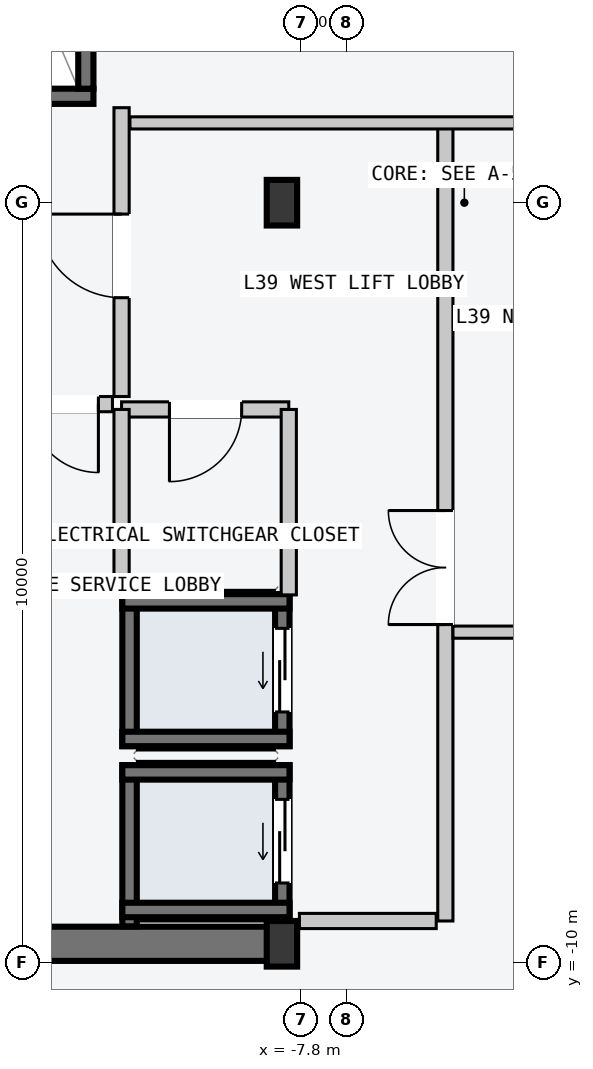
"""IFC4 building model, lengths in metres.
Left out: names, types, materials, properties, quantities, classifications, styles, units other than length and angle.
Written with IfcOpenShell. Run it as: python <this file> out.ifc"""

import sys

from ifc_helpers import new_model, si_unit, direction, frame, frame_2d, origin, origin_2d, place, context, subcontext, project, spatial, rectangle, i_section, extrude, element, fill, save


model = new_model("IFC4")
c1 = context("Model", 3, precision=1e-05, world=origin(), true_north=direction((0.0, 1.0)))
c2 = subcontext(c1, "Body", "Model", "MODEL_VIEW")
j1 = project(units=[si_unit("LENGTHUNIT", "METRE"), si_unit("PLANEANGLEUNIT", "RADIAN")], contexts=[c1])
p1 = place(None, origin())
s1 = spatial("IfcSite", under=j1, at=p1, CompositionType="ELEMENT")
p2 = place(p1, origin())
s2 = spatial("IfcBuilding", under=s1, at=p2, CompositionType="ELEMENT")
p3 = place(p2, frame((0.0, 0.0, 150.6)))
s3 = spatial("IfcBuildingStorey", under=s2, at=p3, CompositionType="ELEMENT", Elevation=150.6)
p4 = place(p3, frame((-14.53, -9.75, -0.2), z_axis=(0.0, 0.0, 1.0), x_axis=(1.0, 0.0, 0.0)))
e1 = element("IfcWall", 1, at=p4, inside=s3, PredefinedType="SHEAR", context=c2, shape_type="SweptSolid", body=[
    extrude(rectangle(XDim=6.46, YDim=0.45, at=frame_2d((3.23, 0.0))), origin(), (0.0, 0.0, 1.0), 4.5),
])
p5 = place(p3, frame((-14.25, 1.4, -0.2), z_axis=(0.0, 0.0, 1.0), x_axis=(1.0, 0.0, 0.0)))
e2 = element("IfcWall", 2, at=p5, inside=s3, PredefinedType="SOLIDWALL", context=c2, shape_type="SweptSolid", body=[
    extrude(rectangle(XDim=3.72, YDim=0.2, at=frame_2d((1.86, 0.0))), origin(), (0.0, 0.0, 1.0), 4.5),
])
p6 = place(p5, frame((1.5, 0.0, 0.2)))
e3 = element("IfcOpeningElement", 3, at=p6, cuts=e2, PredefinedType="OPENING", context=c2, shape_type="SweptSolid", body=[
    extrude(rectangle(XDim=1.12, YDim=2.18, at=frame_2d((0.56, 1.09))), frame((0.0, 0.11, 0.0), z_axis=(0.0, -1.0, 0.0), x_axis=(1.0, 0.0, 0.0)), (0.0, 0.0, 1.0), 0.22),
])
p7 = place(p3, frame((-10.63, 1.5, -0.2), z_axis=(0.0, 0.0, 1.0), x_axis=(0.0, 1.0, 0.0)))
e4 = element("IfcWall", 4, at=p7, inside=s3, PredefinedType="SOLIDWALL", context=c2, shape_type="SweptSolid", body=[
    extrude(rectangle(XDim=7.8, YDim=0.2, at=frame_2d((3.9, 0.0))), origin(), (0.0, 0.0, 1.0), 4.5),
])
for number, where, z_axis, x_axis in (
    (5, (-8.05, -9.75, 0.0), (0.0, 0.0, 1.0), (1.0, 0.0, 0.0)),
    (6, (-8.05, 0.0, 0.0), (0.0, 0.0, 1.0), (1.0, 0.0, 0.0)),
):
    element("IfcColumn", number, at=place(p3, frame(where, z_axis=z_axis, x_axis=x_axis)), inside=s3, PredefinedType="COLUMN", context=c2, shape_type="SweptSolid", body=[
        extrude(i_section(OverallWidth=0.4, OverallDepth=0.6, WebThickness=0.022, FlangeThickness=0.036, at=origin_2d()), origin(), (0.0, 0.0, 1.0), 4.5),
    ])
p8 = place(p3, frame((-8.045, -9.52, -0.2), z_axis=(0.0, 0.0, 1.0), x_axis=(0.0, 1.0, 0.0)))
e7 = element("IfcWall", 7, at=p8, inside=s3, PredefinedType="SOLIDWALL", context=c2, shape_type="SweptSolid", body=[
    extrude(rectangle(XDim=2.12, YDim=0.19, at=frame_2d((1.06, 0.0))), origin(), (0.0, 0.0, 1.0), 4.5),
])
p9 = place(p8, frame((0.57, 0.0, 0.2)))
e8 = element("IfcOpeningElement", 8, at=p9, cuts=e7, PredefinedType="OPENING", context=c2, shape_type="SweptSolid", body=[
    extrude(rectangle(XDim=1.1, YDim=2.2, at=frame_2d((0.55, 1.1))), frame((0.0, 0.105, 0.0), z_axis=(0.0, -1.0, 0.0), x_axis=(1.0, 0.0, 0.0)), (0.0, 0.0, 1.0), 0.21),
])
p10 = place(p3, frame((-10.055, -9.52, -0.2), z_axis=(0.0, 0.0, 1.0), x_axis=(0.0, 1.0, 0.0)))
e9 = element("IfcWall", 9, at=p10, inside=s3, PredefinedType="SOLIDWALL", context=c2, shape_type="SweptSolid", body=[
    extrude(rectangle(XDim=2.12, YDim=0.19, at=frame_2d((1.06, 0.0))), origin(), (0.0, 0.0, 1.0), 4.5),
])
for number, where, z_axis, x_axis in (
    (10, (-10.15, -7.495, -0.2), (0.0, 0.0, 1.0), (1.0, 0.0, 0.0)),
    (11, (-10.15, -9.305, -0.2), (0.0, 0.0, 1.0), (1.0, 0.0, 0.0)),
):
    element("IfcWall", number, at=place(p3, frame(where, z_axis=z_axis, x_axis=x_axis)), inside=s3, PredefinedType="SOLIDWALL", context=c2, shape_type="SweptSolid", body=[
        extrude(rectangle(XDim=2.2, YDim=0.19, at=frame_2d((1.1, 0.0))), origin(), (0.0, 0.0, 1.0), 4.5),
    ])
p11 = place(p3, frame((-8.045, -7.15, -0.2), z_axis=(0.0, 0.0, 1.0), x_axis=(0.0, 1.0, 0.0)))
e12 = element("IfcWall", 12, at=p11, inside=s3, PredefinedType="SOLIDWALL", context=c2, shape_type="SweptSolid", body=[
    extrude(rectangle(XDim=2.0, YDim=0.19, at=frame_2d((1.0, 0.0))), origin(), (0.0, 0.0, 1.0), 4.5),
])
p12 = place(p11, frame((0.45, 0.0, 0.2)))
e13 = element("IfcOpeningElement", 13, at=p12, cuts=e12, PredefinedType="OPENING", context=c2, shape_type="SweptSolid", body=[
    extrude(rectangle(XDim=1.1, YDim=2.2, at=frame_2d((0.55, 1.1))), frame((0.0, 0.105, 0.0), z_axis=(0.0, -1.0, 0.0), x_axis=(1.0, 0.0, 0.0)), (0.0, 0.0, 1.0), 0.21),
])
p13 = place(p3, frame((-10.055, -7.15, -0.2), z_axis=(0.0, 0.0, 1.0), x_axis=(0.0, 1.0, 0.0)))
e14 = element("IfcWall", 14, at=p13, inside=s3, PredefinedType="SOLIDWALL", context=c2, shape_type="SweptSolid", body=[
    extrude(rectangle(XDim=2.0, YDim=0.19, at=frame_2d((1.0, 0.0))), origin(), (0.0, 0.0, 1.0), 4.5),
])
for number, where, z_axis, x_axis in (
    (15, (-10.15, -5.245, -0.2), (0.0, 0.0, 1.0), (1.0, 0.0, 0.0)),
    (16, (-10.15, -7.055, -0.2), (0.0, 0.0, 1.0), (1.0, 0.0, 0.0)),
):
    element("IfcWall", number, at=place(p3, frame(where, z_axis=z_axis, x_axis=x_axis)), inside=s3, PredefinedType="SOLIDWALL", context=c2, shape_type="SweptSolid", body=[
        extrude(rectangle(XDim=2.2, YDim=0.19, at=frame_2d((1.1, 0.0))), origin(), (0.0, 0.0, 1.0), 4.5),
    ])
p14 = place(p3, frame((-5.9, -9.45, 0.0), z_axis=(0.0, 0.0, 1.0), x_axis=(0.0, 1.0, 0.0)))
e17 = element("IfcWall", 17, at=p14, inside=s3, PredefinedType="PARTITIONING", context=c2, shape_type="SweptSolid", body=[
    extrude(rectangle(XDim=10.5, YDim=0.2, at=frame_2d((5.25, 0.0))), origin(), (0.0, 0.0, 1.0), 4.3),
])
p15 = place(p14, frame((3.9, 0.0, 0.0)))
e18 = element("IfcOpeningElement", 18, at=p15, cuts=e17, PredefinedType="OPENING", context=c2, shape_type="SweptSolid", body=[
    extrude(rectangle(XDim=1.5, YDim=2.2, at=frame_2d((0.75, 1.1))), frame((0.0, 0.11, 0.0), z_axis=(0.0, -1.0, 0.0), x_axis=(1.0, 0.0, 0.0)), (0.0, 0.0, 1.0), 0.22),
])
p16 = place(p3, frame((-6.02, -9.45, 0.0), z_axis=(0.0, 0.0, 1.0), x_axis=(-1.0, 0.0, 0.0)))
e19 = element("IfcWall", 19, at=p16, inside=s3, PredefinedType="PARTITIONING", context=c2, shape_type="SweptSolid", body=[
    extrude(rectangle(XDim=1.8, YDim=0.2, at=frame_2d((0.9, 0.0))), origin(), (0.0, 0.0, 1.0), 4.3),
])
p17 = place(p3, frame((-10.16, -2.55, 0.0), z_axis=(0.0, 0.0, 1.0), x_axis=(0.0, 1.0, 0.0)))
e20 = element("IfcWall", 20, at=p17, inside=s3, PredefinedType="PARTITIONING", context=c2, shape_type="SweptSolid", body=[
    extrude(rectangle(XDim=3.8, YDim=0.2, at=frame_2d((1.9, 0.0))), origin(), (0.0, 0.0, 1.0), 4.3),
])
p18 = place(p17, frame((1.3, 0.0, 0.0)))
e21 = element("IfcOpeningElement", 21, at=p18, cuts=e20, PredefinedType="OPENING", context=c2, shape_type="SweptSolid", body=[
    extrude(rectangle(XDim=1.1, YDim=2.15, at=frame_2d((0.55, 1.075))), frame((0.0, 0.11, 0.0), z_axis=(0.0, -1.0, 0.0), x_axis=(1.0, 0.0, 0.0)), (0.0, 0.0, 1.0), 0.22),
])
p19 = place(p3, frame((-10.28, -2.65, 0.0), z_axis=(0.0, 0.0, 1.0), x_axis=(-1.0, 0.0, 0.0)))
e22 = element("IfcWall", 22, at=p19, inside=s3, PredefinedType="PARTITIONING", context=c2, shape_type="SweptSolid", body=[
    extrude(rectangle(XDim=1.27, YDim=0.2, at=frame_2d((0.635, 0.0))), origin(), (0.0, 0.0, 1.0), 4.3),
])
p20 = place(p19, frame((0.185, 0.0, 0.0)))
e23 = element("IfcOpeningElement", 23, at=p20, cuts=e22, PredefinedType="OPENING", context=c2, shape_type="SweptSolid", body=[
    extrude(rectangle(XDim=0.9, YDim=2.15, at=frame_2d((0.45, 1.075))), frame((0.0, 0.11, 0.0), z_axis=(0.0, -1.0, 0.0), x_axis=(1.0, 0.0, 0.0)), (0.0, 0.0, 1.0), 0.22),
])
p21 = place(p3, frame((-7.96, -2.72, 0.0), z_axis=(0.0, 0.0, 1.0), x_axis=(-1.0, 0.0, 0.0)))
e24 = element("IfcWall", 24, at=p21, inside=s3, PredefinedType="PARTITIONING", context=c2, shape_type="SweptSolid", body=[
    extrude(rectangle(XDim=2.2, YDim=0.2, at=frame_2d((1.1, 0.0))), origin(), (0.0, 0.0, 1.0), 4.3),
])
p22 = place(p21, frame((0.62, 0.0, 0.0)))
e25 = element("IfcOpeningElement", 25, at=p22, cuts=e24, PredefinedType="OPENING", context=c2, shape_type="SweptSolid", body=[
    extrude(rectangle(XDim=0.95, YDim=2.1, at=frame_2d((0.475, 1.05))), frame((0.0, 0.11, 0.0), z_axis=(0.0, -1.0, 0.0), x_axis=(1.0, 0.0, 0.0)), (0.0, 0.0, 1.0), 0.22),
])
for number, where, z_axis, x_axis in (
    (26, (-7.96, -5.16, 0.0), (0.0, 0.0, 1.0), (0.0, 1.0, 0.0)),
    (27, (-10.16, -5.16, 0.0), (0.0, 0.0, 1.0), (0.0, 1.0, 0.0)),
):
    element("IfcWall", number, at=place(p3, frame(where, z_axis=z_axis, x_axis=x_axis)), inside=s3, PredefinedType="PARTITIONING", context=c2, shape_type="SweptSolid", body=[
        extrude(rectangle(XDim=2.44, YDim=0.2, at=frame_2d((1.22, 0.0))), origin(), (0.0, 0.0, 1.0), 4.3),
    ])
p23 = place(p3, frame((-10.05, 1.05, 0.0), z_axis=(0.0, 0.0, 1.0), x_axis=(1.0, 0.0, 0.0)))
e28 = element("IfcWall", 28, at=p23, inside=s3, PredefinedType="PARTITIONING", context=c2, shape_type="SweptSolid", body=[
    extrude(rectangle(XDim=6.21, YDim=0.16, at=frame_2d((3.105, 0.0))), origin(), (0.0, 0.0, 1.0), 4.3),
])
p24 = place(p3, frame((-5.8, -5.65, 0.0), z_axis=(0.0, 0.0, 1.0), x_axis=(1.0, 0.0, 0.0)))
e29 = element("IfcWall", 29, at=p24, inside=s3, PredefinedType="PARTITIONING", context=c2, shape_type="SweptSolid", body=[
    extrude(rectangle(XDim=11.6, YDim=0.16, at=frame_2d((5.8, 0.0))), origin(), (0.0, 0.0, 1.0), 4.3),
])
p25 = place(p24, frame((5.1, 0.0, 0.0)))
e30 = element("IfcOpeningElement", 30, at=p25, cuts=e29, PredefinedType="OPENING", context=c2, shape_type="SweptSolid", body=[
    extrude(rectangle(XDim=1.4, YDim=2.2, at=frame_2d((0.7, 1.1))), frame((0.0, 0.09, 0.0), z_axis=(0.0, -1.0, 0.0), x_axis=(1.0, 0.0, 0.0)), (0.0, 0.0, 1.0), 0.18),
])
p26 = place(p9, origin())
e31 = element("IfcDoor", 31, at=p26, inside=s3, OperationType="SLIDING_TO_LEFT", PredefinedType="DOOR", context=c2, shape_type="SweptSolid", body=[
    extrude(rectangle(XDim=1.1, YDim=2.2, at=frame_2d((0.55, 1.1))), frame((0.0, 0.025, 0.0), z_axis=(0.0, -1.0, 0.0), x_axis=(1.0, 0.0, 0.0)), (0.0, 0.0, 1.0), 0.05),
])
fill(e8, e31)
p27 = place(p12, origin())
e32 = element("IfcDoor", 32, at=p27, inside=s3, OperationType="SLIDING_TO_LEFT", PredefinedType="DOOR", context=c2, shape_type="SweptSolid", body=[
    extrude(rectangle(XDim=1.1, YDim=2.2, at=frame_2d((0.55, 1.1))), frame((0.0, 0.025, 0.0), z_axis=(0.0, -1.0, 0.0), x_axis=(1.0, 0.0, 0.0)), (0.0, 0.0, 1.0), 0.05),
])
fill(e13, e32)
p28 = place(p15, origin())
e33 = element("IfcDoor", 33, at=p28, inside=s3, OperationType="DOUBLE_DOOR_SINGLE_SWING", PredefinedType="DOOR", context=c2, shape_type="SweptSolid", body=[
    extrude(rectangle(XDim=1.5, YDim=2.2, at=frame_2d((0.75, 1.1))), frame((0.0, 0.025, 0.0), z_axis=(0.0, -1.0, 0.0), x_axis=(1.0, 0.0, 0.0)), (0.0, 0.0, 1.0), 0.05),
])
fill(e18, e33)
p29 = place(p18, origin())
e34 = element("IfcDoor", 34, at=p29, inside=s3, OperationType="SINGLE_SWING_RIGHT", PredefinedType="DOOR", context=c2, shape_type="SweptSolid", body=[
    extrude(rectangle(XDim=1.1, YDim=2.15, at=frame_2d((0.55, 1.075))), frame((0.0, 0.025, 0.0), z_axis=(0.0, -1.0, 0.0), x_axis=(1.0, 0.0, 0.0)), (0.0, 0.0, 1.0), 0.05),
])
fill(e21, e34)
p30 = place(p20, origin())
e35 = element("IfcDoor", 35, at=p30, inside=s3, OperationType="SINGLE_SWING_LEFT", PredefinedType="DOOR", context=c2, shape_type="SweptSolid", body=[
    extrude(rectangle(XDim=0.9, YDim=2.15, at=frame_2d((0.45, 1.075))), frame((0.0, 0.025, 0.0), z_axis=(0.0, -1.0, 0.0), x_axis=(1.0, 0.0, 0.0)), (0.0, 0.0, 1.0), 0.05),
])
fill(e23, e35)
p31 = place(p22, origin())
e36 = element("IfcDoor", 36, at=p31, inside=s3, OperationType="SINGLE_SWING_RIGHT", PredefinedType="DOOR", context=c2, shape_type="SweptSolid", body=[
    extrude(rectangle(XDim=0.95, YDim=2.1, at=frame_2d((0.475, 1.05))), frame((0.0, 0.025, 0.0), z_axis=(0.0, -1.0, 0.0), x_axis=(1.0, 0.0, 0.0)), (0.0, 0.0, 1.0), 0.05),
])
fill(e25, e36)
save(model, sys.argv[1])
